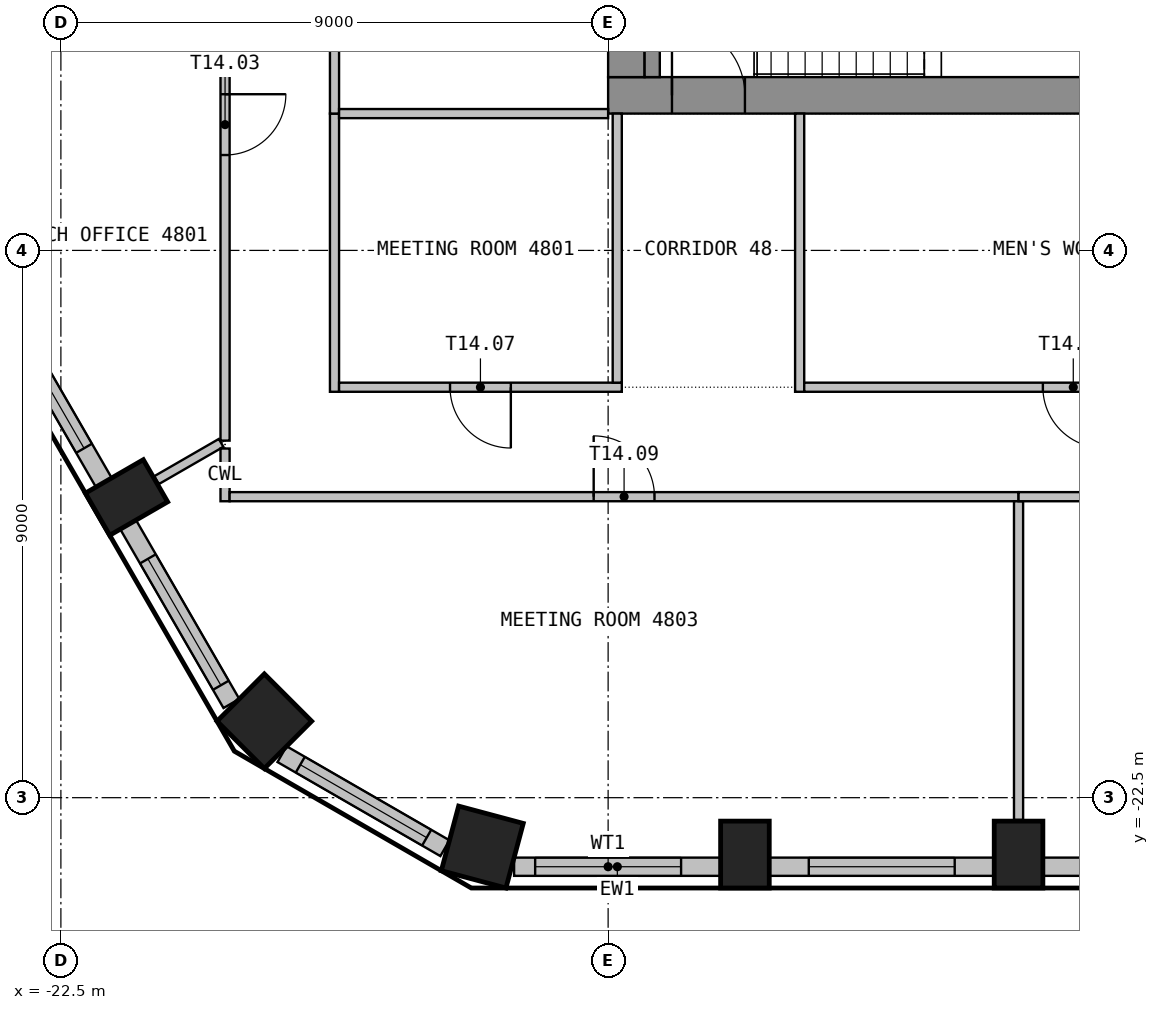
"""IFC4 building model, lengths in metres.
Left out: names, types, materials, properties, quantities, classifications, styles, units other than length and angle.
Written with IfcOpenShell. Run it as: python <this file> out.ifc"""

import sys

from ifc_helpers import new_model, si_unit, direction, frame, frame_2d, origin, origin_2d, place, context, subcontext, project, spatial, rectangle, extrude, element, fill, save


model = new_model("IFC4")
c1 = context("Model", 3, precision=1e-05, world=origin(), true_north=direction((0.0, 1.0)))
c2 = subcontext(c1, "Body", "Model", "MODEL_VIEW")
j1 = project(units=[si_unit("LENGTHUNIT", "METRE"), si_unit("PLANEANGLEUNIT", "RADIAN")], contexts=[c1])
p1 = place(None, origin())
s1 = spatial("IfcSite", under=j1, at=p1, CompositionType="ELEMENT")
p2 = place(p1, origin())
s2 = spatial("IfcBuilding", under=s1, at=p2, CompositionType="ELEMENT")
p3 = place(p2, frame((0.0, 0.0, 195.6)))
s3 = spatial("IfcBuildingStorey", under=s2, at=p3, CompositionType="ELEMENT", Elevation=195.6)
p4 = place(p3, frame((-15.57, -23.312, 0.0), z_axis=(0.0, 0.0, 1.0), x_axis=(0.965925826289, -0.258819045103, 0.0)))
e1 = element("IfcColumn", 1, at=p4, inside=s3, PredefinedType="COLUMN", context=c2, shape_type="SweptSolid", body=[
    extrude(rectangle(XDim=1.1, YDim=1.1, at=origin_2d()), origin(), (0.0, 0.0, 1.0), 3.55),
])
for number, where, z_axis, x_axis in (
    (2, (-11.25, -23.436, 0.0), (0.0, 0.0, 1.0), (1.0, 0.0, 0.0)),
    (3, (-6.75, -23.436, 0.0), (0.0, 0.0, 1.0), (1.0, 0.0, 0.0)),
    (4, (-21.421, -17.563, 0.0), (0.0, 0.0, 1.0), (0.5, -0.866, 0.0)),
):
    element("IfcColumn", number, at=place(p3, frame(where, z_axis=z_axis, x_axis=x_axis)), inside=s3, PredefinedType="COLUMN", context=c2, shape_type="SweptSolid", body=[
        extrude(rectangle(XDim=0.8, YDim=1.1, at=origin_2d()), origin(), (0.0, 0.0, 1.0), 3.55),
    ])
p5 = place(p3, frame((-19.154, -21.242, 0.0), z_axis=(0.0, 0.0, 1.0), x_axis=(0.707106781187, -0.707106781187, 0.0)))
e5 = element("IfcColumn", 5, at=p5, inside=s3, PredefinedType="COLUMN", context=c2, shape_type="SweptSolid", body=[
    extrude(rectangle(XDim=1.1, YDim=1.1, at=origin_2d()), origin(), (0.0, 0.0, 1.0), 3.55),
])
p6 = place(p3, frame((-15.046, -23.635, 0.0), z_axis=(0.0, 0.0, 1.0), x_axis=(1.0, 0.0, 0.0)))
e6 = element("IfcWall", 6, at=p6, inside=s3, PredefinedType="SOLIDWALL", context=c2, shape_type="SweptSolid", body=[
    extrude(rectangle(XDim=3.396, YDim=0.3, at=frame_2d((1.698, 0.0))), origin(), (0.0, 0.0, 1.0), 3.55),
])
p7 = place(p6, frame((0.346, 0.0, 0.9)))
e7 = element("IfcOpeningElement", 7, at=p7, cuts=e6, PredefinedType="OPENING", context=c2, shape_type="SweptSolid", body=[
    extrude(rectangle(XDim=2.4, YDim=2.1, at=frame_2d((1.2, 1.05))), frame((0.0, 0.16, 0.0), z_axis=(0.0, -1.0, 0.0), x_axis=(1.0, 0.0, 0.0)), (0.0, 0.0, 1.0), 0.32),
])
p8 = place(p3, frame((-10.85, -23.635, 0.0), z_axis=(0.0, 0.0, 1.0), x_axis=(1.0, 0.0, 0.0)))
e8 = element("IfcWall", 8, at=p8, inside=s3, PredefinedType="SOLIDWALL", context=c2, shape_type="SweptSolid", body=[
    extrude(rectangle(XDim=3.699, YDim=0.3, at=frame_2d((1.85, 0.0))), origin(), (0.0, 0.0, 1.0), 3.55),
])
p9 = place(p8, frame((0.649, 0.0, 0.9)))
e9 = element("IfcOpeningElement", 9, at=p9, cuts=e8, PredefinedType="OPENING", context=c2, shape_type="SweptSolid", body=[
    extrude(rectangle(XDim=2.4, YDim=2.1, at=frame_2d((1.2, 1.05))), frame((0.0, 0.16, 0.0), z_axis=(0.0, -1.0, 0.0), x_axis=(1.0, 0.0, 0.0)), (0.0, 0.0, 1.0), 0.32),
])
p10 = place(p3, frame((-6.35, -23.635, 0.0), z_axis=(0.0, 0.0, 1.0), x_axis=(1.0, 0.0, 0.0)))
e10 = element("IfcWall", 10, at=p10, inside=s3, PredefinedType="SOLIDWALL", context=c2, shape_type="SweptSolid", body=[
    extrude(rectangle(XDim=3.699, YDim=0.3, at=frame_2d((1.85, 0.0))), origin(), (0.0, 0.0, 1.0), 3.55),
])
p11 = place(p10, frame((0.649, 0.0, 0.9)))
e11 = element("IfcOpeningElement", 11, at=p11, cuts=e10, PredefinedType="OPENING", context=c2, shape_type="SweptSolid", body=[
    extrude(rectangle(XDim=2.4, YDim=2.1, at=frame_2d((1.2, 1.05))), frame((0.0, 0.16, 0.0), z_axis=(0.0, -1.0, 0.0), x_axis=(1.0, 0.0, 0.0)), (0.0, 0.0, 1.0), 0.32),
])
p12 = place(p3, frame((-23.644, -14.113, 0.0), z_axis=(0.0, 0.0, 1.0), x_axis=(0.500029062817, -0.866008623709, 0.0)))
e12 = element("IfcWall", 12, at=p12, inside=s3, PredefinedType="SOLIDWALL", context=c2, shape_type="SweptSolid", body=[
    extrude(rectangle(XDim=3.699, YDim=0.3, at=frame_2d((1.85, 0.0))), origin(), (0.0, 0.0, 1.0), 3.55),
])
p13 = place(p12, frame((0.649, 0.0, 0.9)))
e13 = element("IfcOpeningElement", 13, at=p13, cuts=e12, PredefinedType="OPENING", context=c2, shape_type="SweptSolid", body=[
    extrude(rectangle(XDim=2.4, YDim=2.1, at=frame_2d((1.2, 1.05))), frame((0.0, 0.16, 0.0), z_axis=(0.0, -1.0, 0.0), x_axis=(1.0, 0.0, 0.0)), (0.0, 0.0, 1.0), 0.32),
])
p14 = place(p3, frame((-21.394, -18.01, 0.0), z_axis=(0.0, 0.0, 1.0), x_axis=(0.500012868213, -0.866017974191, 0.0)))
e14 = element("IfcWall", 14, at=p14, inside=s3, PredefinedType="SOLIDWALL", context=c2, shape_type="SweptSolid", body=[
    extrude(rectangle(XDim=3.396, YDim=0.3, at=frame_2d((1.698, 0.0))), origin(), (0.0, 0.0, 1.0), 3.55),
])
p15 = place(p14, frame((0.649, 0.0, 0.9)))
e15 = element("IfcOpeningElement", 15, at=p15, cuts=e14, PredefinedType="OPENING", context=c2, shape_type="SweptSolid", body=[
    extrude(rectangle(XDim=2.4, YDim=2.1, at=frame_2d((1.2, 1.05))), frame((0.0, 0.16, 0.0), z_axis=(0.0, -1.0, 0.0), x_axis=(1.0, 0.0, 0.0)), (0.0, 0.0, 1.0), 0.32),
])
p16 = place(p3, frame((-18.863, -21.784, 0.0), z_axis=(0.0, 0.0, 1.0), x_axis=(0.865994975416, -0.500052699777, 0.0)))
e16 = element("IfcWall", 16, at=p16, inside=s3, PredefinedType="SOLIDWALL", context=c2, shape_type="SweptSolid", body=[
    extrude(rectangle(XDim=3.093, YDim=0.3, at=frame_2d((1.546, 0.0))), origin(), (0.0, 0.0, 1.0), 3.55),
])
p17 = place(p16, frame((0.346, 0.0, 0.9)))
e17 = element("IfcOpeningElement", 17, at=p17, cuts=e16, PredefinedType="OPENING", context=c2, shape_type="SweptSolid", body=[
    extrude(rectangle(XDim=2.4, YDim=2.1, at=frame_2d((1.2, 1.05))), frame((0.0, 0.16, 0.0), z_axis=(0.0, -1.0, 0.0), x_axis=(1.0, 0.0, 0.0)), (0.0, 0.0, 1.0), 0.32),
])
p18 = place(p3, frame((-13.5, -10.95, 0.0), z_axis=(0.0, 0.0, 1.0), x_axis=(1.0, 0.0, 0.0)))
e18 = element("IfcWall", 18, at=p18, inside=s3, PredefinedType="SHEAR", context=c2, shape_type="SweptSolid", body=[
    extrude(rectangle(XDim=27.0, YDim=0.6, at=frame_2d((13.5, 0.0))), origin(), (0.0, 0.0, 1.0), 3.55),
])
p19 = place(p18, frame((12.3, 0.0, 0.0)))
e19 = element("IfcOpeningElement", 19, at=p19, cuts=e18, PredefinedType="OPENING", context=c2, shape_type="SweptSolid", body=[
    extrude(rectangle(XDim=2.4, YDim=2.1, at=frame_2d((1.2, 1.05))), frame((0.0, 0.31, 0.0), z_axis=(0.0, -1.0, 0.0), x_axis=(1.0, 0.0, 0.0)), (0.0, 0.0, 1.0), 0.62),
])
p20 = place(p18, frame((1.05, 0.0, 0.0)))
e20 = element("IfcOpeningElement", 20, at=p20, cuts=e18, PredefinedType="OPENING", context=c2, shape_type="SweptSolid", body=[
    extrude(rectangle(XDim=1.2, YDim=2.1, at=frame_2d((0.6, 1.05))), frame((0.0, 0.31, 0.0), z_axis=(0.0, -1.0, 0.0), x_axis=(1.0, 0.0, 0.0)), (0.0, 0.0, 1.0), 0.62),
])
p21 = place(p18, frame((24.75, 0.0, 0.0)))
e21 = element("IfcOpeningElement", 21, at=p21, cuts=e18, PredefinedType="OPENING", context=c2, shape_type="SweptSolid", body=[
    extrude(rectangle(XDim=1.2, YDim=2.1, at=frame_2d((0.6, 1.05))), frame((0.0, 0.31, 0.0), z_axis=(0.0, -1.0, 0.0), x_axis=(1.0, 0.0, 0.0)), (0.0, 0.0, 1.0), 0.62),
])
p22 = place(p3, frame((-13.2, -10.65, 0.0), z_axis=(0.0, 0.0, 1.0), x_axis=(0.0, 1.0, 0.0)))
e22 = element("IfcWall", 22, at=p22, inside=s3, PredefinedType="SHEAR", context=c2, shape_type="SweptSolid", body=[
    extrude(rectangle(XDim=21.3, YDim=0.6, at=frame_2d((10.65, 0.0))), origin(), (0.0, 0.0, 1.0), 3.55),
])
p23 = place(p22, frame((9.45, 0.0, 0.0)))
e23 = element("IfcOpeningElement", 23, at=p23, cuts=e22, PredefinedType="OPENING", context=c2, shape_type="SweptSolid", body=[
    extrude(rectangle(XDim=2.4, YDim=2.1, at=frame_2d((1.2, 1.05))), frame((0.0, 0.31, 0.0), z_axis=(0.0, -1.0, 0.0), x_axis=(1.0, 0.0, 0.0)), (0.0, 0.0, 1.0), 0.62),
])
p24 = place(p3, frame((-12.775, -10.65, 0.0), z_axis=(0.0, 0.0, 1.0), x_axis=(0.0, 1.0, 0.0)))
e24 = element("IfcWall", 24, at=p24, inside=s3, PredefinedType="SHEAR", context=c2, shape_type="SweptSolid", body=[
    extrude(rectangle(XDim=3.25, YDim=0.25, at=frame_2d((1.625, 0.0))), origin(), (0.0, 0.0, 1.0), 3.55),
])
p25 = place(p3, frame((-19.865, -16.666, 0.0), z_axis=(0.0, 0.0, 1.0), x_axis=(-0.866202157257, -0.499693728962, 0.0)))
e25 = element("IfcWall", 25, at=p25, inside=s3, PredefinedType="PARTITIONING", context=c2, shape_type="SweptSolid", body=[
    extrude(rectangle(XDim=1.226, YDim=0.15, at=frame_2d((0.613, 0.0))), origin(), (0.0, 0.0, 1.0), 3.55),
])
p26 = place(p3, frame((-19.8, -16.758, 0.0), z_axis=(0.0, 0.0, 1.0), x_axis=(0.0, -1.0, 0.0)))
e26 = element("IfcWall", 26, at=p26, inside=s3, PredefinedType="PARTITIONING", context=c2, shape_type="SweptSolid", body=[
    extrude(rectangle(XDim=0.867, YDim=0.15, at=frame_2d((0.434, 0.0))), origin(), (0.0, 0.0, 1.0), 3.55),
])
p27 = place(p3, frame((-19.725, -17.55, 0.0), z_axis=(0.0, 0.0, 1.0), x_axis=(1.0, 0.0, 0.0)))
e27 = element("IfcWall", 27, at=p27, inside=s3, PredefinedType="PARTITIONING", context=c2, shape_type="SweptSolid", body=[
    extrude(rectangle(XDim=12.975, YDim=0.15, at=frame_2d((6.488, 0.0))), origin(), (0.0, 0.0, 1.0), 3.55),
])
p28 = place(p27, frame((5.988, 0.0, 0.0)))
e28 = element("IfcOpeningElement", 28, at=p28, cuts=e27, PredefinedType="OPENING", context=c2, shape_type="SweptSolid", body=[
    extrude(rectangle(XDim=1.0, YDim=2.1, at=frame_2d((0.5, 1.05))), frame((0.0, 0.085, 0.0), z_axis=(0.0, -1.0, 0.0), x_axis=(1.0, 0.0, 0.0)), (0.0, 0.0, 1.0), 0.17),
])
p29 = place(p3, frame((-19.8, -6.235, 0.0), z_axis=(0.0, 0.0, 1.0), x_axis=(0.0, -1.0, 0.0)))
e29 = element("IfcWall", 29, at=p29, inside=s3, PredefinedType="PARTITIONING", context=c2, shape_type="SweptSolid", body=[
    extrude(rectangle(XDim=10.393, YDim=0.15, at=frame_2d((5.196, 0.0))), origin(), (0.0, 0.0, 1.0), 3.55),
])
p30 = place(p29, frame((4.697, 0.0, 0.0)))
e30 = element("IfcOpeningElement", 30, at=p30, cuts=e29, PredefinedType="OPENING", context=c2, shape_type="SweptSolid", body=[
    extrude(rectangle(XDim=1.0, YDim=2.1, at=frame_2d((0.5, 1.05))), frame((0.0, 0.085, 0.0), z_axis=(0.0, -1.0, 0.0), x_axis=(1.0, 0.0, 0.0)), (0.0, 0.0, 1.0), 0.17),
])
p31 = place(p3, frame((-18.0, -15.825, 0.0), z_axis=(0.0, 0.0, 1.0), x_axis=(0.0, 1.0, 0.0)))
e31 = element("IfcWall", 31, at=p31, inside=s3, PredefinedType="PARTITIONING", context=c2, shape_type="SweptSolid", body=[
    extrude(rectangle(XDim=4.575, YDim=0.15, at=frame_2d((2.288, 0.0))), origin(), (0.0, 0.0, 1.0), 3.55),
])
p32 = place(p3, frame((-13.275, -15.75, 0.0), z_axis=(0.0, 0.0, 1.0), x_axis=(-1.0, 0.0, 0.0)))
e32 = element("IfcWall", 32, at=p32, inside=s3, PredefinedType="PARTITIONING", context=c2, shape_type="SweptSolid", body=[
    extrude(rectangle(XDim=4.65, YDim=0.15, at=frame_2d((2.325, 0.0))), origin(), (0.0, 0.0, 1.0), 3.55),
])
p33 = place(p32, frame((1.825, 0.0, 0.0)))
e33 = element("IfcOpeningElement", 33, at=p33, cuts=e32, PredefinedType="OPENING", context=c2, shape_type="SweptSolid", body=[
    extrude(rectangle(XDim=1.0, YDim=2.1, at=frame_2d((0.5, 1.05))), frame((0.0, 0.085, 0.0), z_axis=(0.0, -1.0, 0.0), x_axis=(1.0, 0.0, 0.0)), (0.0, 0.0, 1.0), 0.17),
])
p34 = place(p3, frame((-18.0, -11.25, 0.0), z_axis=(0.0, 0.0, 1.0), x_axis=(0.0, 1.0, 0.0)))
e34 = element("IfcWall", 34, at=p34, inside=s3, PredefinedType="PARTITIONING", context=c2, shape_type="SweptSolid", body=[
    extrude(rectangle(XDim=9.825, YDim=0.15, at=frame_2d((4.913, 0.0))), origin(), (0.0, 0.0, 1.0), 3.55),
])
p35 = place(p34, frame((4.413, 0.0, 0.0)))
e35 = element("IfcOpeningElement", 35, at=p35, cuts=e34, PredefinedType="OPENING", context=c2, shape_type="SweptSolid", body=[
    extrude(rectangle(XDim=1.0, YDim=2.1, at=frame_2d((0.5, 1.05))), frame((0.0, 0.085, 0.0), z_axis=(0.0, -1.0, 0.0), x_axis=(1.0, 0.0, 0.0)), (0.0, 0.0, 1.0), 0.17),
])
for number, where, z_axis, x_axis in (
    (36, (-13.5, -11.25, 0.0), (0.0, 0.0, 1.0), (-1.0, 0.0, 0.0)),
    (37, (-13.35, -11.25, 0.0), (0.0, 0.0, 1.0), (0.0, -1.0, 0.0)),
):
    element("IfcWall", number, at=place(p3, frame(where, z_axis=z_axis, x_axis=x_axis)), inside=s3, PredefinedType="PARTITIONING", context=c2, shape_type="SweptSolid", body=[
        extrude(rectangle(XDim=4.425, YDim=0.15, at=frame_2d((2.212, 0.0))), origin(), (0.0, 0.0, 1.0), 3.55),
    ])
p36 = place(p3, frame((-10.35, -15.825, 0.0), z_axis=(0.0, 0.0, 1.0), x_axis=(0.0, 1.0, 0.0)))
e38 = element("IfcWall", 38, at=p36, inside=s3, PredefinedType="PARTITIONING", context=c2, shape_type="SweptSolid", body=[
    extrude(rectangle(XDim=4.575, YDim=0.15, at=frame_2d((2.288, 0.0))), origin(), (0.0, 0.0, 1.0), 3.55),
])
p37 = place(p3, frame((-1.425, -15.75, 0.0), z_axis=(0.0, 0.0, 1.0), x_axis=(-1.0, 0.0, 0.0)))
e39 = element("IfcWall", 39, at=p37, inside=s3, PredefinedType="PARTITIONING", context=c2, shape_type="SweptSolid", body=[
    extrude(rectangle(XDim=8.85, YDim=0.15, at=frame_2d((4.425, 0.0))), origin(), (0.0, 0.0, 1.0), 3.55),
])
p38 = place(p37, frame((3.925, 0.0, 0.0)))
e40 = element("IfcOpeningElement", 40, at=p38, cuts=e39, PredefinedType="OPENING", context=c2, shape_type="SweptSolid", body=[
    extrude(rectangle(XDim=1.0, YDim=2.1, at=frame_2d((0.5, 1.05))), frame((0.0, 0.085, 0.0), z_axis=(0.0, -1.0, 0.0), x_axis=(1.0, 0.0, 0.0)), (0.0, 0.0, 1.0), 0.17),
])
p39 = place(p3, frame((-6.75, -17.625, 0.0), z_axis=(0.0, 0.0, 1.0), x_axis=(0.0, -1.0, 0.0)))
e41 = element("IfcWall", 41, at=p39, inside=s3, PredefinedType="PARTITIONING", context=c2, shape_type="SweptSolid", body=[
    extrude(rectangle(XDim=5.24, YDim=0.15, at=frame_2d((2.62, 0.0))), origin(), (0.0, 0.0, 1.0), 3.55),
])
p40 = place(p3, frame((-6.75, -17.55, 0.0), z_axis=(0.0, 0.0, 1.0), x_axis=(1.0, 0.0, 0.0)))
e42 = element("IfcWall", 42, at=p40, inside=s3, PredefinedType="PARTITIONING", context=c2, shape_type="SweptSolid", body=[
    extrude(rectangle(XDim=9.0, YDim=0.15, at=frame_2d((4.5, 0.0))), origin(), (0.0, 0.0, 1.0), 3.55),
])
p41 = place(p40, frame((4.0, 0.0, 0.0)))
e43 = element("IfcOpeningElement", 43, at=p41, cuts=e42, PredefinedType="OPENING", context=c2, shape_type="SweptSolid", body=[
    extrude(rectangle(XDim=1.0, YDim=2.1, at=frame_2d((0.5, 1.05))), frame((0.0, 0.085, 0.0), z_axis=(0.0, -1.0, 0.0), x_axis=(1.0, 0.0, 0.0)), (0.0, 0.0, 1.0), 0.17),
])
p42 = place(p7, origin())
e44 = element("IfcWindow", 44, at=p42, inside=s3, PartitioningType="SINGLE_PANEL", PredefinedType="WINDOW", context=c2, shape_type="SweptSolid", body=[
    extrude(rectangle(XDim=2.4, YDim=2.1, at=frame_2d((1.2, 1.05))), frame((0.0, 0.03, 0.0), z_axis=(0.0, -1.0, 0.0), x_axis=(1.0, 0.0, 0.0)), (0.0, 0.0, 1.0), 0.06),
])
fill(e7, e44)
p43 = place(p9, origin())
e45 = element("IfcWindow", 45, at=p43, inside=s3, PartitioningType="SINGLE_PANEL", PredefinedType="WINDOW", context=c2, shape_type="SweptSolid", body=[
    extrude(rectangle(XDim=2.4, YDim=2.1, at=frame_2d((1.2, 1.05))), frame((0.0, 0.03, 0.0), z_axis=(0.0, -1.0, 0.0), x_axis=(1.0, 0.0, 0.0)), (0.0, 0.0, 1.0), 0.06),
])
fill(e9, e45)
p44 = place(p13, origin())
e46 = element("IfcWindow", 46, at=p44, inside=s3, PartitioningType="SINGLE_PANEL", PredefinedType="WINDOW", context=c2, shape_type="SweptSolid", body=[
    extrude(rectangle(XDim=2.4, YDim=2.1, at=frame_2d((1.2, 1.05))), frame((0.0, 0.03, 0.0), z_axis=(0.0, -1.0, 0.0), x_axis=(1.0, 0.0, 0.0)), (0.0, 0.0, 1.0), 0.06),
])
fill(e13, e46)
p45 = place(p15, origin())
e47 = element("IfcWindow", 47, at=p45, inside=s3, PartitioningType="SINGLE_PANEL", PredefinedType="WINDOW", context=c2, shape_type="SweptSolid", body=[
    extrude(rectangle(XDim=2.4, YDim=2.1, at=frame_2d((1.2, 1.05))), frame((0.0, 0.03, 0.0), z_axis=(0.0, -1.0, 0.0), x_axis=(1.0, 0.0, 0.0)), (0.0, 0.0, 1.0), 0.06),
])
fill(e15, e47)
p46 = place(p17, origin())
e48 = element("IfcWindow", 48, at=p46, inside=s3, PartitioningType="SINGLE_PANEL", PredefinedType="WINDOW", context=c2, shape_type="SweptSolid", body=[
    extrude(rectangle(XDim=2.4, YDim=2.1, at=frame_2d((1.2, 1.05))), frame((0.0, 0.03, 0.0), z_axis=(0.0, -1.0, 0.0), x_axis=(1.0, 0.0, 0.0)), (0.0, 0.0, 1.0), 0.06),
])
fill(e17, e48)
p47 = place(p20, origin())
e49 = element("IfcDoor", 49, at=p47, inside=s3, OperationType="SINGLE_SWING_RIGHT", PredefinedType="DOOR", context=c2, shape_type="SweptSolid", body=[
    extrude(rectangle(XDim=1.2, YDim=2.1, at=frame_2d((0.6, 1.05))), frame((0.0, 0.025, 0.0), z_axis=(0.0, -1.0, 0.0), x_axis=(1.0, 0.0, 0.0)), (0.0, 0.0, 1.0), 0.05),
])
fill(e20, e49)
p48 = place(p30, origin())
e50 = element("IfcDoor", 50, at=p48, inside=s3, OperationType="SINGLE_SWING_LEFT", PredefinedType="DOOR", context=c2, shape_type="SweptSolid", body=[
    extrude(rectangle(XDim=1.0, YDim=2.1, at=frame_2d((0.5, 1.05))), frame((0.0, 0.025, 0.0), z_axis=(0.0, -1.0, 0.0), x_axis=(1.0, 0.0, 0.0)), (0.0, 0.0, 1.0), 0.05),
])
fill(e30, e50)
p49 = place(p33, origin())
e51 = element("IfcDoor", 51, at=p49, inside=s3, OperationType="SINGLE_SWING_RIGHT", PredefinedType="DOOR", context=c2, shape_type="SweptSolid", body=[
    extrude(rectangle(XDim=1.0, YDim=2.1, at=frame_2d((0.5, 1.05))), frame((0.0, 0.025, 0.0), z_axis=(0.0, -1.0, 0.0), x_axis=(1.0, 0.0, 0.0)), (0.0, 0.0, 1.0), 0.05),
])
fill(e33, e51)
p50 = place(p28, origin())
e52 = element("IfcDoor", 52, at=p50, inside=s3, OperationType="SINGLE_SWING_RIGHT", PredefinedType="DOOR", context=c2, shape_type="SweptSolid", body=[
    extrude(rectangle(XDim=1.0, YDim=2.1, at=frame_2d((0.5, 1.05))), frame((0.0, 0.025, 0.0), z_axis=(0.0, -1.0, 0.0), x_axis=(1.0, 0.0, 0.0)), (0.0, 0.0, 1.0), 0.05),
])
fill(e28, e52)
p51 = place(p38, origin())
e53 = element("IfcDoor", 53, at=p51, inside=s3, OperationType="SINGLE_SWING_RIGHT", PredefinedType="DOOR", context=c2, shape_type="SweptSolid", body=[
    extrude(rectangle(XDim=1.0, YDim=2.1, at=frame_2d((0.5, 1.05))), frame((0.0, 0.025, 0.0), z_axis=(0.0, -1.0, 0.0), x_axis=(1.0, 0.0, 0.0)), (0.0, 0.0, 1.0), 0.05),
])
fill(e40, e53)
save(model, sys.argv[1])
